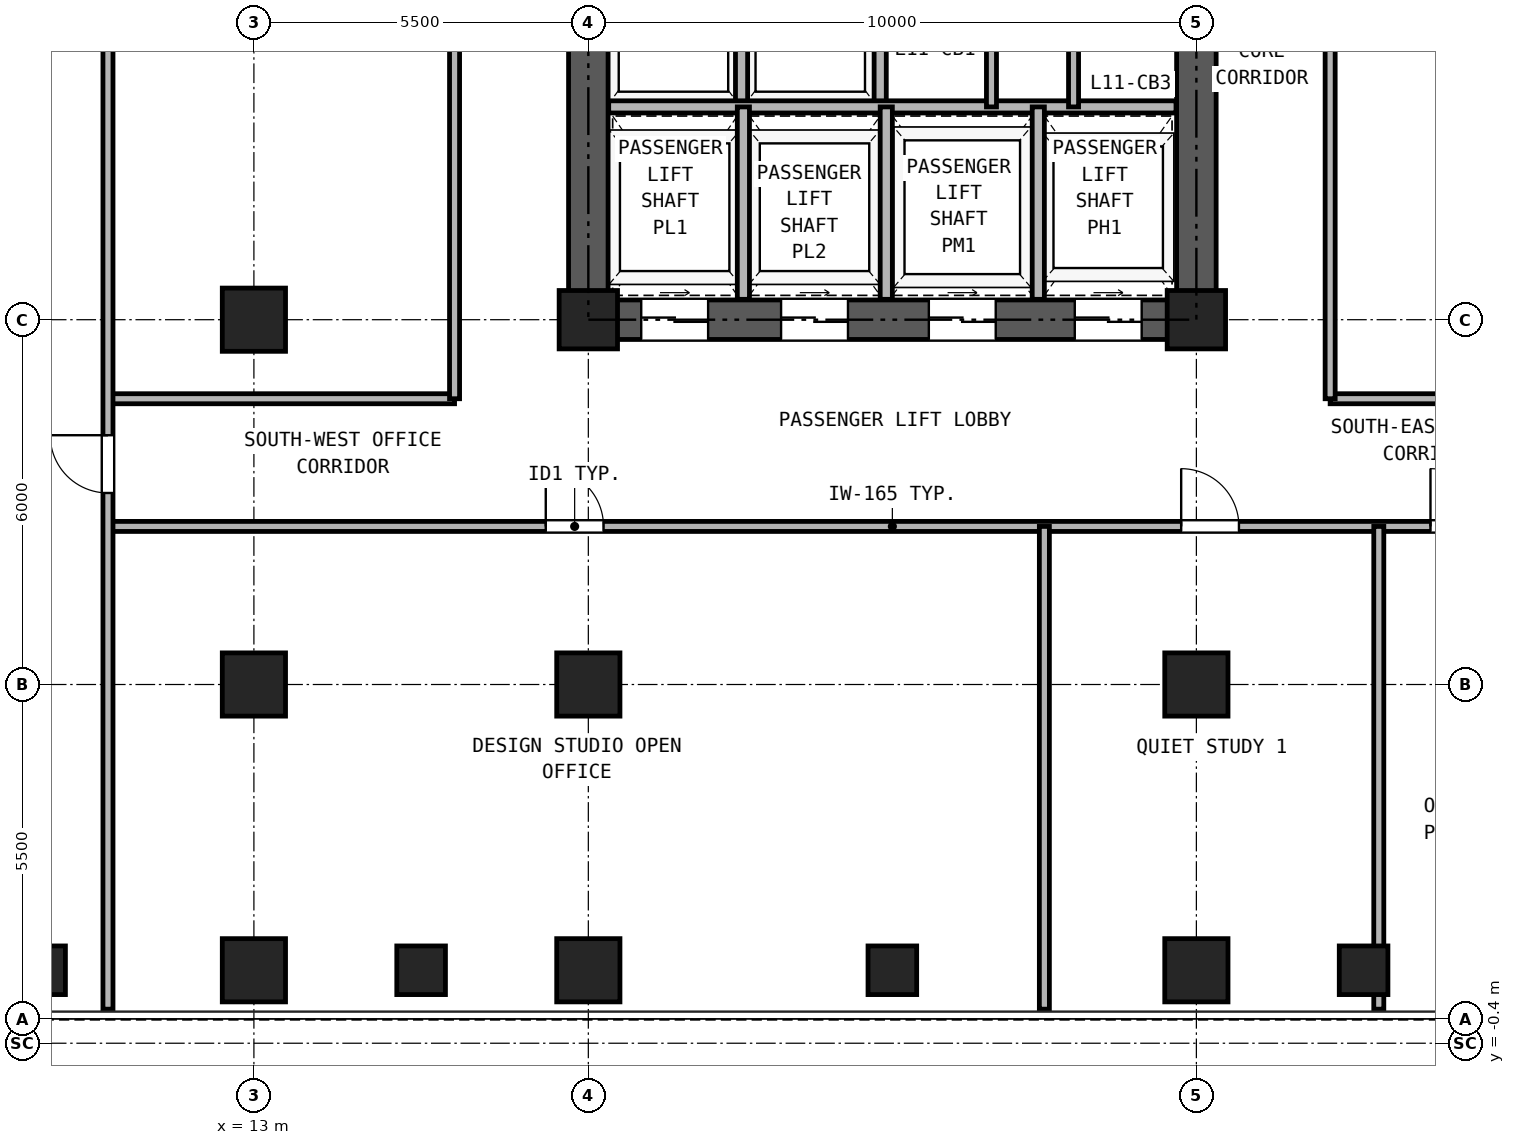
"""IFC4 building model, lengths in metres.
Left out: names, types, materials, properties, quantities, classifications, styles, units other than length and angle.
Written with IfcOpenShell. Run it as: python <this file> out.ifc"""

import sys

from ifc_helpers import new_model, si_unit, direction, frame, frame_2d, origin, origin_2d, place, context, subcontext, project, spatial, rectangle, hollow_rectangle, extrude, source, transform, mapped, element, fill, save


model = new_model("IFC4")
c1 = context("Model", 3, precision=1e-05, world=origin(), true_north=direction((0.0, 1.0)))
c2 = subcontext(c1, "Body", "Model", "MODEL_VIEW")
j1 = project(units=[si_unit("LENGTHUNIT", "METRE"), si_unit("PLANEANGLEUNIT", "RADIAN")], contexts=[c1])
p1 = place(None, origin())
s1 = spatial("IfcSite", under=j1, at=p1, CompositionType="ELEMENT")
p2 = place(p1, origin())
s2 = spatial("IfcBuilding", under=s1, at=p2, CompositionType="ELEMENT")
p3 = place(p2, frame((0.0, 0.0, 44.1)))
s3 = spatial("IfcBuildingStorey", under=s2, at=p3, CompositionType="ELEMENT", Elevation=44.1)
m1 = source(origin(), c2, "Body", "SweptSolid", [
    extrude(hollow_rectangle(XDim=1.04, YDim=1.04, WallThickness=0.065, at=origin_2d()), origin(), (0.0, 0.0, 1.0), 3.32),
])
for number, where, z_axis, x_axis in (
    (1, (13.0, 0.8, 0.0), (0.0, 0.0, 1.0), (1.0, 0.0, 0.0)),
    (2, (18.5, 0.8, 0.0), (0.0, 0.0, 1.0), (1.0, 0.0, 0.0)),
    (3, (28.5, 0.8, 0.0), (0.0, 0.0, 1.0), (1.0, 0.0, 0.0)),
    (4, (13.0, 5.5, 0.0), (0.0, 0.0, 1.0), (1.0, 0.0, 0.0)),
    (5, (13.0, 11.5, 0.0), (0.0, 0.0, 1.0), (1.0, 0.0, 0.0)),
    (6, (18.5, 5.5, 0.0), (0.0, 0.0, 1.0), (1.0, 0.0, 0.0)),
):
    element("IfcColumn", number, at=place(p3, frame(where, z_axis=z_axis, x_axis=x_axis)), inside=s3, PredefinedType="COLUMN", context=c2, shape_type="MappedRepresentation", body=[
        mapped(m1, transform((0.0, 0.0, 0.0), x_axis=(1.0, 0.0, 0.0), y_axis=(0.0, 1.0, 0.0), z_axis=(0.0, 0.0, 1.0), scale=1.0)),
    ])
m2 = source(origin(), c2, "Body", "SweptSolid", [
    extrude(hollow_rectangle(XDim=0.96, YDim=0.96, WallThickness=0.06, at=origin_2d()), origin(), (0.0, 0.0, 1.0), 3.32),
])
p4 = place(p3, frame((18.5, 11.5, 0.0), z_axis=(0.0, 0.0, 1.0), x_axis=(1.0, 0.0, 0.0)))
e7 = element("IfcColumn", 7, at=p4, inside=s3, PredefinedType="COLUMN", context=c2, shape_type="MappedRepresentation", body=[
    mapped(m2, transform((0.0, 0.0, 0.0), x_axis=(1.0, 0.0, 0.0), y_axis=(0.0, 1.0, 0.0), z_axis=(0.0, 0.0, 1.0), scale=1.0)),
])
p5 = place(p3, frame((28.5, 5.5, 0.0), z_axis=(0.0, 0.0, 1.0), x_axis=(1.0, 0.0, 0.0)))
e8 = element("IfcColumn", 8, at=p5, inside=s3, PredefinedType="COLUMN", context=c2, shape_type="MappedRepresentation", body=[
    mapped(m1, transform((0.0, 0.0, 0.0), x_axis=(1.0, 0.0, 0.0), y_axis=(0.0, 1.0, 0.0), z_axis=(0.0, 0.0, 1.0), scale=1.0)),
])
p6 = place(p3, frame((28.5, 11.5, 0.0), z_axis=(0.0, 0.0, 1.0), x_axis=(1.0, 0.0, 0.0)))
e9 = element("IfcColumn", 9, at=p6, inside=s3, PredefinedType="COLUMN", context=c2, shape_type="MappedRepresentation", body=[
    mapped(m2, transform((0.0, 0.0, 0.0), x_axis=(1.0, 0.0, 0.0), y_axis=(0.0, 1.0, 0.0), z_axis=(0.0, 0.0, 1.0), scale=1.0)),
])
m3 = source(origin(), c2, "Body", "SweptSolid", [
    extrude(hollow_rectangle(XDim=0.8, YDim=0.8, WallThickness=0.045, at=origin_2d()), origin(), (0.0, 0.0, 1.0), 3.32),
])
for number, where, z_axis, x_axis in (
    (10, (9.5, 0.8, 0.0), (0.0, 0.0, 1.0), (1.0, 0.0, 0.0)),
    (11, (15.75, 0.8, 0.0), (0.0, 0.0, 1.0), (1.0, 0.0, 0.0)),
    (12, (23.5, 0.8, 0.0), (0.0, 0.0, 1.0), (1.0, 0.0, 0.0)),
    (13, (31.25, 0.8, 0.0), (0.0, 0.0, 1.0), (1.0, 0.0, 0.0)),
):
    element("IfcColumn", number, at=place(p3, frame(where, z_axis=z_axis, x_axis=x_axis)), inside=s3, PredefinedType="COLUMN", context=c2, shape_type="MappedRepresentation", body=[
        mapped(m3, transform((0.0, 0.0, 0.0), x_axis=(1.0, 0.0, 0.0), y_axis=(0.0, 1.0, 0.0), z_axis=(0.0, 0.0, 1.0), scale=1.0)),
    ])
p7 = place(p3, frame((18.175, 11.5, 0.0), z_axis=(0.0, 0.0, 1.0), x_axis=(1.0, 0.0, 0.0)))
e14 = element("IfcWall", 14, at=p7, inside=s3, PredefinedType="SHEAR", context=c2, shape_type="SweptSolid", body=[
    extrude(rectangle(XDim=10.65, YDim=0.65, at=frame_2d((5.325, 0.0))), origin(), (0.0, 0.0, 1.0), 3.32),
])
p8 = place(p7, frame((1.195, 0.0, 0.0)))
e15 = element("IfcOpeningElement", 15, at=p8, cuts=e14, PredefinedType="OPENING", context=c2, shape_type="SweptSolid", body=[
    extrude(rectangle(XDim=1.1, YDim=2.25, at=frame_2d((0.55, 1.125))), frame((0.0, 0.335, 0.0), z_axis=(0.0, -1.0, 0.0), x_axis=(1.0, 0.0, 0.0)), (0.0, 0.0, 1.0), 0.67),
])
p9 = place(p7, frame((3.495, 0.0, 0.0)))
e16 = element("IfcOpeningElement", 16, at=p9, cuts=e14, PredefinedType="OPENING", context=c2, shape_type="SweptSolid", body=[
    extrude(rectangle(XDim=1.1, YDim=2.25, at=frame_2d((0.55, 1.125))), frame((0.0, 0.335, 0.0), z_axis=(0.0, -1.0, 0.0), x_axis=(1.0, 0.0, 0.0)), (0.0, 0.0, 1.0), 0.67),
])
p10 = place(p7, frame((5.925, 0.0, 0.0)))
e17 = element("IfcOpeningElement", 17, at=p10, cuts=e14, PredefinedType="OPENING", context=c2, shape_type="SweptSolid", body=[
    extrude(rectangle(XDim=1.1, YDim=2.25, at=frame_2d((0.55, 1.125))), frame((0.0, 0.335, 0.0), z_axis=(0.0, -1.0, 0.0), x_axis=(1.0, 0.0, 0.0)), (0.0, 0.0, 1.0), 0.67),
])
p11 = place(p7, frame((8.325, 0.0, 0.0)))
e18 = element("IfcOpeningElement", 18, at=p11, cuts=e14, PredefinedType="OPENING", context=c2, shape_type="SweptSolid", body=[
    extrude(rectangle(XDim=1.1, YDim=2.25, at=frame_2d((0.55, 1.125))), frame((0.0, 0.335, 0.0), z_axis=(0.0, -1.0, 0.0), x_axis=(1.0, 0.0, 0.0)), (0.0, 0.0, 1.0), 0.67),
])
p12 = place(p3, frame((18.5, 11.825, 0.0), z_axis=(0.0, 0.0, 1.0), x_axis=(0.0, 1.0, 0.0)))
e19 = element("IfcWall", 19, at=p12, inside=s3, PredefinedType="SHEAR", context=c2, shape_type="SweptSolid", body=[
    extrude(rectangle(XDim=16.6, YDim=0.65, at=frame_2d((8.3, 0.0))), origin(), (0.0, 0.0, 1.0), 3.32),
])
p13 = place(p12, frame((7.325, 0.0, 0.0)))
e20 = element("IfcOpeningElement", 20, at=p13, cuts=e19, PredefinedType="OPENING", context=c2, shape_type="SweptSolid", body=[
    extrude(rectangle(XDim=1.15, YDim=2.2, at=frame_2d((0.575, 1.1))), frame((0.0, 0.335, 0.0), z_axis=(0.0, -1.0, 0.0), x_axis=(1.0, 0.0, 0.0)), (0.0, 0.0, 1.0), 0.67),
])
p14 = place(p3, frame((28.5, 11.825, 0.0), z_axis=(0.0, 0.0, 1.0), x_axis=(0.0, 1.0, 0.0)))
e21 = element("IfcWall", 21, at=p14, inside=s3, PredefinedType="SHEAR", context=c2, shape_type="SweptSolid", body=[
    extrude(rectangle(XDim=16.6, YDim=0.65, at=frame_2d((8.3, 0.0))), origin(), (0.0, 0.0, 1.0), 3.32),
])
p15 = place(p14, frame((7.325, 0.0, 0.0)))
e22 = element("IfcOpeningElement", 22, at=p15, cuts=e21, PredefinedType="OPENING", context=c2, shape_type="SweptSolid", body=[
    extrude(rectangle(XDim=1.15, YDim=2.2, at=frame_2d((0.575, 1.1))), frame((0.0, 0.335, 0.0), z_axis=(0.0, -1.0, 0.0), x_axis=(1.0, 0.0, 0.0)), (0.0, 0.0, 1.0), 0.67),
])
for number, where, z_axis, x_axis in (
    (23, (21.02, 15.0, 0.0), (0.0, 0.0, 1.0), (0.0, 1.0, 0.0)),
    (24, (23.3, 15.0, 0.0), (0.0, 0.0, 1.0), (0.0, 1.0, 0.0)),
):
    element("IfcWall", number, at=place(p3, frame(where, z_axis=z_axis, x_axis=x_axis)), inside=s3, PredefinedType="PARTITIONING", context=c2, shape_type="SweptSolid", body=[
        extrude(rectangle(XDim=3.0, YDim=0.2, at=frame_2d((1.5, 0.0))), origin(), (0.0, 0.0, 1.0), 3.32),
    ])
p16 = place(p3, frame((18.835, 15.0, 0.0), z_axis=(0.0, 0.0, 1.0), x_axis=(1.0, 0.0, 0.0)))
e25 = element("IfcWall", 25, at=p16, inside=s3, PredefinedType="PARTITIONING", context=c2, shape_type="SweptSolid", body=[
    extrude(rectangle(XDim=9.33, YDim=0.2, at=frame_2d((4.665, 0.0))), origin(), (0.0, 0.0, 1.0), 3.32),
])
p17 = place(p3, frame((25.13, 15.0, 0.0), z_axis=(0.0, 0.0, 1.0), x_axis=(0.0, 1.0, 0.0)))
e26 = element("IfcWall", 26, at=p17, inside=s3, PredefinedType="PARTITIONING", context=c2, shape_type="SweptSolid", body=[
    extrude(rectangle(XDim=3.0, YDim=0.165, at=frame_2d((1.5, 0.0))), origin(), (0.0, 0.0, 1.0), 3.32),
])
p18 = place(p3, frame((26.48, 15.0, 0.0), z_axis=(0.0, 0.0, 1.0), x_axis=(0.0, 1.0, 0.0)))
e27 = element("IfcWall", 27, at=p18, inside=s3, PredefinedType="PARTITIONING", context=c2, shape_type="SweptSolid", body=[
    extrude(rectangle(XDim=3.0, YDim=0.165, at=frame_2d((1.5, 0.0))), origin(), (0.0, 0.0, 1.0), 3.32),
])
p19 = place(p18, frame((1.05, 0.0, 0.0)))
e28 = element("IfcOpeningElement", 28, at=p19, cuts=e27, PredefinedType="OPENING", context=c2, shape_type="SweptSolid", body=[
    extrude(rectangle(XDim=0.9, YDim=2.05, at=frame_2d((0.45, 1.025))), frame((0.0, 0.093, 0.0), z_axis=(0.0, -1.0, 0.0), x_axis=(1.0, 0.0, 0.0)), (0.0, 0.0, 1.0), 0.185),
])
for number, where, z_axis, x_axis in (
    (29, (21.05, 11.835, 0.0), (0.0, 0.0, 1.0), (0.0, 1.0, 0.0)),
    (30, (23.4, 11.835, 0.0), (0.0, 0.0, 1.0), (0.0, 1.0, 0.0)),
    (31, (25.9, 11.835, 0.0), (0.0, 0.0, 1.0), (0.0, 1.0, 0.0)),
):
    element("IfcWall", number, at=place(p3, frame(where, z_axis=z_axis, x_axis=x_axis)), inside=s3, PredefinedType="PARTITIONING", context=c2, shape_type="SweptSolid", body=[
        extrude(rectangle(XDim=3.165, YDim=0.2, at=frame_2d((1.583, 0.0))), origin(), (0.0, 0.0, 1.0), 3.32),
    ])
p20 = place(p3, frame((10.6, 8.1, 0.0), z_axis=(0.0, 0.0, 1.0), x_axis=(1.0, 0.0, 0.0)))
e32 = element("IfcWall", 32, at=p20, inside=s3, PredefinedType="PARTITIONING", context=c2, shape_type="SweptSolid", body=[
    extrude(rectangle(XDim=25.8, YDim=0.165, at=frame_2d((12.9, 0.0))), origin(), (0.0, 0.0, 1.0), 3.32),
])
p21 = place(p20, frame((7.2, 0.0, 0.0)))
e33 = element("IfcOpeningElement", 33, at=p21, cuts=e32, PredefinedType="OPENING", context=c2, shape_type="SweptSolid", body=[
    extrude(rectangle(XDim=0.95, YDim=2.15, at=frame_2d((0.475, 1.075))), frame((0.0, 0.093, 0.0), z_axis=(0.0, -1.0, 0.0), x_axis=(1.0, 0.0, 0.0)), (0.0, 0.0, 1.0), 0.185),
])
p22 = place(p20, frame((17.65, 0.0, 0.0)))
e34 = element("IfcOpeningElement", 34, at=p22, cuts=e32, PredefinedType="OPENING", context=c2, shape_type="SweptSolid", body=[
    extrude(rectangle(XDim=0.95, YDim=2.15, at=frame_2d((0.475, 1.075))), frame((0.0, 0.093, 0.0), z_axis=(0.0, -1.0, 0.0), x_axis=(1.0, 0.0, 0.0)), (0.0, 0.0, 1.0), 0.185),
])
p23 = place(p20, frame((21.75, 0.0, 0.0)))
e35 = element("IfcOpeningElement", 35, at=p23, cuts=e32, PredefinedType="OPENING", context=c2, shape_type="SweptSolid", body=[
    extrude(rectangle(XDim=0.95, YDim=2.15, at=frame_2d((0.475, 1.075))), frame((0.0, 0.093, 0.0), z_axis=(0.0, -1.0, 0.0), x_axis=(1.0, 0.0, 0.0)), (0.0, 0.0, 1.0), 0.185),
])
p24 = place(p20, frame((24.2, 0.0, 0.0)))
e36 = element("IfcOpeningElement", 36, at=p24, cuts=e32, PredefinedType="OPENING", context=c2, shape_type="SweptSolid", body=[
    extrude(rectangle(XDim=0.92, YDim=2.1, at=frame_2d((0.46, 1.05))), frame((0.0, 0.093, 0.0), z_axis=(0.0, -1.0, 0.0), x_axis=(1.0, 0.0, 0.0)), (0.0, 0.0, 1.0), 0.185),
])
for number, where, z_axis, x_axis in (
    (37, (10.6, 10.2, 0.0), (0.0, 0.0, 1.0), (1.0, 0.0, 0.0)),
    (38, (30.7, 10.2, 0.0), (0.0, 0.0, 1.0), (1.0, 0.0, 0.0)),
):
    element("IfcWall", number, at=place(p3, frame(where, z_axis=z_axis, x_axis=x_axis)), inside=s3, PredefinedType="PARTITIONING", context=c2, shape_type="SweptSolid", body=[
        extrude(rectangle(XDim=5.7, YDim=0.165, at=frame_2d((2.85, 0.0))), origin(), (0.0, 0.0, 1.0), 3.32),
    ])
p25 = place(p3, frame((16.3, 10.2, 0.0), z_axis=(0.0, 0.0, 1.0), x_axis=(0.0, 1.0, 0.0)))
e39 = element("IfcWall", 39, at=p25, inside=s3, PredefinedType="PARTITIONING", context=c2, shape_type="SweptSolid", body=[
    extrude(rectangle(XDim=19.7, YDim=0.165, at=frame_2d((9.85, 0.0))), origin(), (0.0, 0.0, 1.0), 3.32),
])
p26 = place(p25, frame((5.859, 0.0, 0.0)))
e40 = element("IfcOpeningElement", 40, at=p26, cuts=e39, PredefinedType="OPENING", context=c2, shape_type="SweptSolid", body=[
    extrude(rectangle(XDim=0.95, YDim=2.15, at=frame_2d((0.475, 1.075))), frame((0.0, 0.093, 0.0), z_axis=(0.0, -1.0, 0.0), x_axis=(1.0, 0.0, 0.0)), (0.0, 0.0, 1.0), 0.185),
])
p27 = place(p25, frame((15.709, 0.0, 0.0)))
e41 = element("IfcOpeningElement", 41, at=p27, cuts=e39, PredefinedType="OPENING", context=c2, shape_type="SweptSolid", body=[
    extrude(rectangle(XDim=0.95, YDim=2.15, at=frame_2d((0.475, 1.075))), frame((0.0, 0.093, 0.0), z_axis=(0.0, -1.0, 0.0), x_axis=(1.0, 0.0, 0.0)), (0.0, 0.0, 1.0), 0.185),
])
p28 = place(p3, frame((30.7, 10.2, 0.0), z_axis=(0.0, 0.0, 1.0), x_axis=(0.0, 1.0, 0.0)))
e42 = element("IfcWall", 42, at=p28, inside=s3, PredefinedType="PARTITIONING", context=c2, shape_type="SweptSolid", body=[
    extrude(rectangle(XDim=19.7, YDim=0.165, at=frame_2d((9.85, 0.0))), origin(), (0.0, 0.0, 1.0), 3.32),
])
p29 = place(p28, frame((9.35, 0.0, 0.0)))
e43 = element("IfcOpeningElement", 43, at=p29, cuts=e42, PredefinedType="OPENING", context=c2, shape_type="SweptSolid", body=[
    extrude(rectangle(XDim=0.95, YDim=2.15, at=frame_2d((0.475, 1.075))), frame((0.0, 0.093, 0.0), z_axis=(0.0, -1.0, 0.0), x_axis=(1.0, 0.0, 0.0)), (0.0, 0.0, 1.0), 0.185),
])
p30 = place(p3, frame((10.6, 0.16, 0.0), z_axis=(0.0, 0.0, 1.0), x_axis=(0.0, 1.0, 0.0)))
e44 = element("IfcWall", 44, at=p30, inside=s3, PredefinedType="PARTITIONING", context=c2, shape_type="SweptSolid", body=[
    extrude(rectangle(XDim=40.18, YDim=0.165, at=frame_2d((20.09, 0.0))), origin(), (0.0, 0.0, 1.0), 3.32),
])
p31 = place(p30, frame((8.49, 0.0, 0.0)))
e45 = element("IfcOpeningElement", 45, at=p31, cuts=e44, PredefinedType="OPENING", context=c2, shape_type="SweptSolid", body=[
    extrude(rectangle(XDim=0.95, YDim=2.15, at=frame_2d((0.475, 1.075))), frame((0.0, 0.093, 0.0), z_axis=(0.0, -1.0, 0.0), x_axis=(1.0, 0.0, 0.0)), (0.0, 0.0, 1.0), 0.185),
])
p32 = place(p30, frame((30.29, 0.0, 0.0)))
e46 = element("IfcOpeningElement", 46, at=p32, cuts=e44, PredefinedType="OPENING", context=c2, shape_type="SweptSolid", body=[
    extrude(rectangle(XDim=0.95, YDim=2.15, at=frame_2d((0.475, 1.075))), frame((0.0, 0.093, 0.0), z_axis=(0.0, -1.0, 0.0), x_axis=(1.0, 0.0, 0.0)), (0.0, 0.0, 1.0), 0.185),
])
for number, where, z_axis, x_axis in (
    (47, (26.0, 0.16, 0.0), (0.0, 0.0, 1.0), (0.0, 1.0, 0.0)),
    (48, (31.5, 0.16, 0.0), (0.0, 0.0, 1.0), (0.0, 1.0, 0.0)),
):
    element("IfcWall", number, at=place(p3, frame(where, z_axis=z_axis, x_axis=x_axis)), inside=s3, PredefinedType="PARTITIONING", context=c2, shape_type="SweptSolid", body=[
        extrude(rectangle(XDim=7.94, YDim=0.165, at=frame_2d((3.97, 0.0))), origin(), (0.0, 0.0, 1.0), 3.32),
    ])
p33 = place(p8, frame((1.1, 0.0, 0.0), z_axis=(0.0, 0.0, 1.0), x_axis=(-1.0, 0.0, 0.0)))
e49 = element("IfcDoor", 49, at=p33, inside=s3, OperationType="DOUBLE_DOOR_SLIDING", PredefinedType="DOOR", context=c2, shape_type="SweptSolid", body=[
    extrude(rectangle(XDim=1.1, YDim=2.25, at=frame_2d((0.55, 1.125))), frame((0.0, 0.025, 0.0), z_axis=(0.0, -1.0, 0.0), x_axis=(1.0, 0.0, 0.0)), (0.0, 0.0, 1.0), 0.05),
])
fill(e15, e49)
p34 = place(p9, frame((1.1, 0.0, 0.0), z_axis=(0.0, 0.0, 1.0), x_axis=(-1.0, 0.0, 0.0)))
e50 = element("IfcDoor", 50, at=p34, inside=s3, OperationType="DOUBLE_DOOR_SLIDING", PredefinedType="DOOR", context=c2, shape_type="SweptSolid", body=[
    extrude(rectangle(XDim=1.1, YDim=2.25, at=frame_2d((0.55, 1.125))), frame((0.0, 0.025, 0.0), z_axis=(0.0, -1.0, 0.0), x_axis=(1.0, 0.0, 0.0)), (0.0, 0.0, 1.0), 0.05),
])
fill(e16, e50)
p35 = place(p10, frame((1.1, 0.0, 0.0), z_axis=(0.0, 0.0, 1.0), x_axis=(-1.0, 0.0, 0.0)))
e51 = element("IfcDoor", 51, at=p35, inside=s3, OperationType="DOUBLE_DOOR_SLIDING", PredefinedType="DOOR", context=c2, shape_type="SweptSolid", body=[
    extrude(rectangle(XDim=1.1, YDim=2.25, at=frame_2d((0.55, 1.125))), frame((0.0, 0.025, 0.0), z_axis=(0.0, -1.0, 0.0), x_axis=(1.0, 0.0, 0.0)), (0.0, 0.0, 1.0), 0.05),
])
fill(e17, e51)
p36 = place(p11, frame((1.1, 0.0, 0.0), z_axis=(0.0, 0.0, 1.0), x_axis=(-1.0, 0.0, 0.0)))
e52 = element("IfcDoor", 52, at=p36, inside=s3, OperationType="DOUBLE_DOOR_SLIDING", PredefinedType="DOOR", context=c2, shape_type="SweptSolid", body=[
    extrude(rectangle(XDim=1.1, YDim=2.25, at=frame_2d((0.55, 1.125))), frame((0.0, 0.025, 0.0), z_axis=(0.0, -1.0, 0.0), x_axis=(1.0, 0.0, 0.0)), (0.0, 0.0, 1.0), 0.05),
])
fill(e18, e52)
p37 = place(p21, frame((0.95, 0.0, 0.0), z_axis=(0.0, 0.0, 1.0), x_axis=(-1.0, 0.0, 0.0)))
e53 = element("IfcDoor", 53, at=p37, inside=s3, OperationType="SINGLE_SWING_LEFT", PredefinedType="DOOR", context=c2, shape_type="SweptSolid", body=[
    extrude(rectangle(XDim=0.95, YDim=2.15, at=frame_2d((0.475, 1.075))), frame((0.0, 0.025, 0.0), z_axis=(0.0, -1.0, 0.0), x_axis=(1.0, 0.0, 0.0)), (0.0, 0.0, 1.0), 0.05),
])
fill(e33, e53)
p38 = place(p22, frame((0.95, 0.0, 0.0), z_axis=(0.0, 0.0, 1.0), x_axis=(-1.0, 0.0, 0.0)))
e54 = element("IfcDoor", 54, at=p38, inside=s3, OperationType="SINGLE_SWING_LEFT", PredefinedType="DOOR", context=c2, shape_type="SweptSolid", body=[
    extrude(rectangle(XDim=0.95, YDim=2.15, at=frame_2d((0.475, 1.075))), frame((0.0, 0.025, 0.0), z_axis=(0.0, -1.0, 0.0), x_axis=(1.0, 0.0, 0.0)), (0.0, 0.0, 1.0), 0.05),
])
fill(e34, e54)
p39 = place(p23, frame((0.95, 0.0, 0.0), z_axis=(0.0, 0.0, 1.0), x_axis=(-1.0, 0.0, 0.0)))
e55 = element("IfcDoor", 55, at=p39, inside=s3, OperationType="SINGLE_SWING_LEFT", PredefinedType="DOOR", context=c2, shape_type="SweptSolid", body=[
    extrude(rectangle(XDim=0.95, YDim=2.15, at=frame_2d((0.475, 1.075))), frame((0.0, 0.025, 0.0), z_axis=(0.0, -1.0, 0.0), x_axis=(1.0, 0.0, 0.0)), (0.0, 0.0, 1.0), 0.05),
])
fill(e35, e55)
p40 = place(p31, frame((0.95, 0.0, 0.0), z_axis=(0.0, 0.0, 1.0), x_axis=(-1.0, 0.0, 0.0)))
e56 = element("IfcDoor", 56, at=p40, inside=s3, OperationType="SINGLE_SWING_RIGHT", PredefinedType="DOOR", context=c2, shape_type="SweptSolid", body=[
    extrude(rectangle(XDim=0.95, YDim=2.15, at=frame_2d((0.475, 1.075))), frame((0.0, 0.025, 0.0), z_axis=(0.0, -1.0, 0.0), x_axis=(1.0, 0.0, 0.0)), (0.0, 0.0, 1.0), 0.05),
])
fill(e45, e56)
save(model, sys.argv[1])
